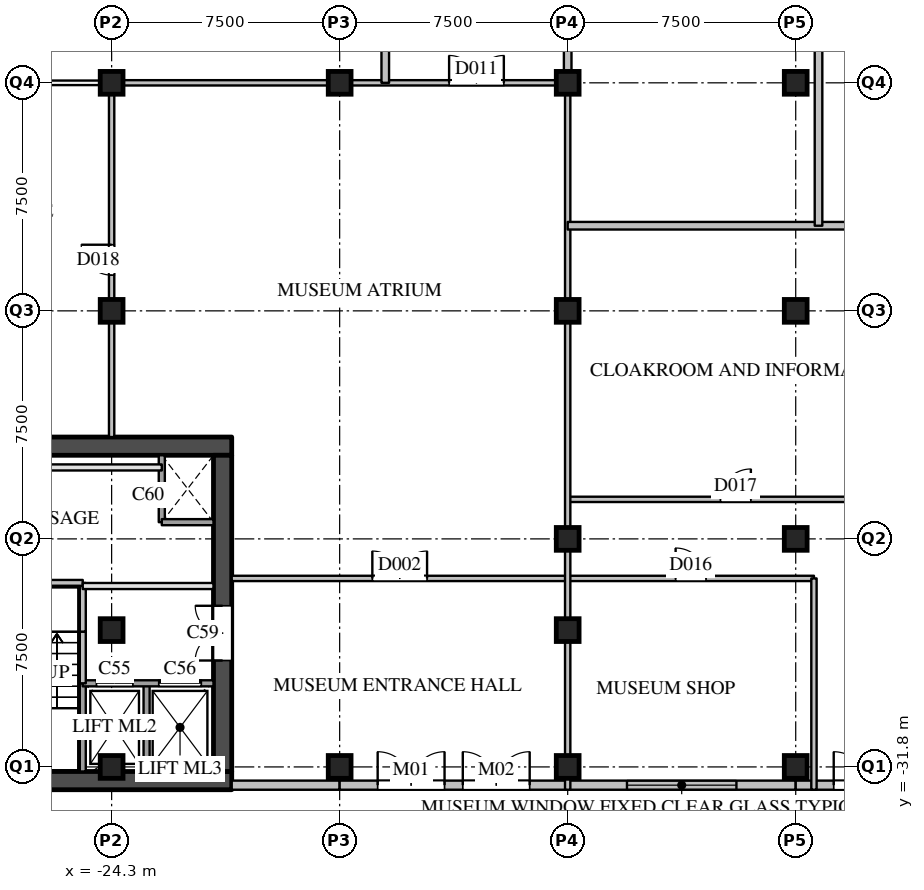
"""IFC4 building model, lengths in metres.
Left out: names, types, materials, properties, quantities, classifications, styles, units other than length and angle.
Written with IfcOpenShell. Run it as: python <this file> out.ifc"""

import sys

from ifc_helpers import new_model, si_unit, direction, frame, frame_2d, origin, origin_2d, place, context, subcontext, project, spatial, rectangle, extrude, element, fill, save


model = new_model("IFC4")
c1 = context("Model", 3, precision=1e-05, world=origin(), true_north=direction((0.0, 1.0)))
c2 = subcontext(c1, "Body", "Model", "MODEL_VIEW")
j1 = project(units=[si_unit("LENGTHUNIT", "METRE"), si_unit("PLANEANGLEUNIT", "RADIAN")], contexts=[c1])
p1 = place(None, origin())
s1 = spatial("IfcSite", under=j1, at=p1, CompositionType="ELEMENT")
p2 = place(p1, origin())
s2 = spatial("IfcBuilding", under=s1, at=p2, CompositionType="ELEMENT")
p3 = place(p2, origin())
s3 = spatial("IfcBuildingStorey", under=s2, at=p3, CompositionType="ELEMENT", Elevation=0.0)
for number, where, z_axis, x_axis in (
    (1, (-24.3, -31.8, 0.0), (0.0, 0.0, 1.0), (1.0, 0.0, 0.0)),
    (2, (-24.3, -16.8, 0.0), (0.0, 0.0, 1.0), (1.0, 0.0, 0.0)),
    (3, (-24.3, -9.3, 0.0), (0.0, 0.0, 1.0), (1.0, 0.0, 0.0)),
    (4, (-16.8, -31.8, 0.0), (0.0, 0.0, 1.0), (1.0, 0.0, 0.0)),
    (5, (-16.8, -9.3, 0.0), (0.0, 0.0, 1.0), (1.0, 0.0, 0.0)),
    (6, (-9.3, -31.8, 0.0), (0.0, 0.0, 1.0), (1.0, 0.0, 0.0)),
    (7, (-9.3, -24.3, 0.0), (0.0, 0.0, 1.0), (1.0, 0.0, 0.0)),
    (8, (-9.3, -16.8, 0.0), (0.0, 0.0, 1.0), (1.0, 0.0, 0.0)),
    (9, (-9.3, -9.3, 0.0), (0.0, 0.0, 1.0), (1.0, 0.0, 0.0)),
    (10, (-1.8, -31.8, 0.0), (0.0, 0.0, 1.0), (1.0, 0.0, 0.0)),
    (11, (-1.8, -24.3, 0.0), (0.0, 0.0, 1.0), (1.0, 0.0, 0.0)),
    (12, (-1.8, -16.8, 0.0), (0.0, 0.0, 1.0), (1.0, 0.0, 0.0)),
    (13, (-1.8, -9.3, 0.0), (0.0, 0.0, 1.0), (1.0, 0.0, 0.0)),
    (14, (-24.3, -27.3, 0.0), (0.0, 0.0, 1.0), (1.0, 0.0, 0.0)),
    (15, (-9.3, -27.3, 0.0), (0.0, 0.0, 1.0), (1.0, 0.0, 0.0)),
):
    element("IfcColumn", number, at=place(p3, frame(where, z_axis=z_axis, x_axis=x_axis)), inside=s3, PredefinedType="COLUMN", context=c2, shape_type="SweptSolid", body=[
        extrude(rectangle(XDim=0.75, YDim=0.75, at=origin_2d()), origin(), (0.0, 0.0, 1.0), 8.0),
    ])
p4 = place(p3, frame((-20.35, -32.4, 0.0), z_axis=(0.0, 0.0, 1.0), x_axis=(1.0, 0.0, 0.0)))
e16 = element("IfcWall", 16, at=p4, inside=s3, PredefinedType="SOLIDWALL", context=c2, shape_type="SweptSolid", body=[
    extrude(rectangle(XDim=3.55, YDim=0.3, at=frame_2d((1.775, 0.0))), origin(), (0.0, 0.0, 1.0), 7.59),
])
p5 = place(p3, frame((-16.8, -32.4, 0.0), z_axis=(0.0, 0.0, 1.0), x_axis=(1.0, 0.0, 0.0)))
e17 = element("IfcWall", 17, at=p5, inside=s3, PredefinedType="SOLIDWALL", context=c2, shape_type="SweptSolid", body=[
    extrude(rectangle(XDim=7.5, YDim=0.3, at=frame_2d((3.75, 0.0))), origin(), (0.0, 0.0, 1.0), 7.59),
])
p6 = place(p5, frame((1.25, 0.0, 0.0)))
e18 = element("IfcOpeningElement", 18, at=p6, cuts=e17, PredefinedType="OPENING", context=c2, shape_type="SweptSolid", body=[
    extrude(rectangle(XDim=2.2, YDim=2.4, at=frame_2d((1.1, 1.2))), frame((0.0, 0.16, 0.0), z_axis=(0.0, -1.0, 0.0), x_axis=(1.0, 0.0, 0.0)), (0.0, 0.0, 1.0), 0.32),
])
p7 = place(p5, frame((4.05, 0.0, 0.0)))
e19 = element("IfcOpeningElement", 19, at=p7, cuts=e17, PredefinedType="OPENING", context=c2, shape_type="SweptSolid", body=[
    extrude(rectangle(XDim=2.2, YDim=2.4, at=frame_2d((1.1, 1.2))), frame((0.0, 0.16, 0.0), z_axis=(0.0, -1.0, 0.0), x_axis=(1.0, 0.0, 0.0)), (0.0, 0.0, 1.0), 0.32),
])
p8 = place(p3, frame((-9.3, -32.4, 0.0), z_axis=(0.0, 0.0, 1.0), x_axis=(1.0, 0.0, 0.0)))
e20 = element("IfcWall", 20, at=p8, inside=s3, PredefinedType="SOLIDWALL", context=c2, shape_type="SweptSolid", body=[
    extrude(rectangle(XDim=7.5, YDim=0.3, at=frame_2d((3.75, 0.0))), origin(), (0.0, 0.0, 1.0), 7.59),
])
p9 = place(p8, frame((1.95, 0.0, 0.9)))
e21 = element("IfcOpeningElement", 21, at=p9, cuts=e20, PredefinedType="OPENING", context=c2, shape_type="SweptSolid", body=[
    extrude(rectangle(XDim=3.6, YDim=3.0, at=frame_2d((1.8, 1.5))), frame((0.0, 0.16, 0.0), z_axis=(0.0, -1.0, 0.0), x_axis=(1.0, 0.0, 0.0)), (0.0, 0.0, 1.0), 0.32),
])
p10 = place(p3, frame((-1.8, -32.4, 0.0), z_axis=(0.0, 0.0, 1.0), x_axis=(1.0, 0.0, 0.0)))
e22 = element("IfcWall", 22, at=p10, inside=s3, PredefinedType="SOLIDWALL", context=c2, shape_type="SweptSolid", body=[
    extrude(rectangle(XDim=3.55, YDim=0.3, at=frame_2d((1.775, 0.0))), origin(), (0.0, 0.0, 1.0), 7.59),
])
p11 = place(p10, frame((1.25, 0.0, 0.0)))
e23 = element("IfcOpeningElement", 23, at=p11, cuts=e22, PredefinedType="OPENING", context=c2, shape_type="SweptSolid", body=[
    extrude(rectangle(XDim=2.2, YDim=2.4, at=frame_2d((1.1, 1.2))), frame((0.0, 0.16, 0.0), z_axis=(0.0, -1.0, 0.0), x_axis=(1.0, 0.0, 0.0)), (0.0, 0.0, 1.0), 0.32),
])
for number, where, z_axis, x_axis in (
    (24, (-32.55, -32.25, 0.0), (0.0, 0.0, 1.0), (1.0, 0.0, 0.0)),
    (25, (-32.55, -21.25, 0.0), (0.0, 0.0, 1.0), (1.0, 0.0, 0.0)),
):
    element("IfcWall", number, at=place(p3, frame(where, z_axis=z_axis, x_axis=x_axis)), inside=s3, PredefinedType="SHEAR", context=c2, shape_type="SweptSolid", body=[
        extrude(rectangle(XDim=12.2, YDim=0.6, at=frame_2d((6.1, 0.0))), origin(), (0.0, 0.0, 1.0), 7.59),
    ])
p12 = place(p3, frame((-20.65, -31.95, 0.0), z_axis=(0.0, 0.0, 1.0), x_axis=(0.0, 1.0, 0.0)))
e26 = element("IfcWall", 26, at=p12, inside=s3, PredefinedType="SHEAR", context=c2, shape_type="SweptSolid", body=[
    extrude(rectangle(XDim=10.4, YDim=0.6, at=frame_2d((5.2, 0.0))), origin(), (0.0, 0.0, 1.0), 7.59),
])
p13 = place(p12, frame((3.65, 0.0, 0.0)))
e27 = element("IfcOpeningElement", 27, at=p13, cuts=e26, PredefinedType="OPENING", context=c2, shape_type="SweptSolid", body=[
    extrude(rectangle(XDim=1.8, YDim=2.1, at=frame_2d((0.9, 1.05))), frame((0.0, 0.31, 0.0), z_axis=(0.0, -1.0, 0.0), x_axis=(1.0, 0.0, 0.0)), (0.0, 0.0, 1.0), 0.62),
])
p14 = place(p3, frame((-25.25, -31.95, 0.0), z_axis=(0.0, 0.0, 1.0), x_axis=(0.0, 1.0, 0.0)))
e28 = element("IfcWall", 28, at=p14, inside=s3, PredefinedType="SOLIDWALL", context=c2, shape_type="SweptSolid", body=[
    extrude(rectangle(XDim=2.9, YDim=0.2, at=frame_2d((1.45, 0.0))), origin(), (0.0, 0.0, 1.0), 7.59),
])
p15 = place(p3, frame((-25.25, -29.05, 0.0), z_axis=(0.0, 0.0, 1.0), x_axis=(0.0, 1.0, 0.0)))
e29 = element("IfcWall", 29, at=p15, inside=s3, PredefinedType="SOLIDWALL", context=c2, shape_type="SweptSolid", body=[
    extrude(rectangle(XDim=1.7, YDim=0.2, at=frame_2d((0.85, 0.0))), origin(), (0.0, 0.0, 1.0), 7.59),
])
p16 = place(p3, frame((-25.25, -27.35, 0.0), z_axis=(0.0, 0.0, 1.0), x_axis=(0.0, 1.0, 0.0)))
e30 = element("IfcWall", 30, at=p16, inside=s3, PredefinedType="SOLIDWALL", context=c2, shape_type="SweptSolid", body=[
    extrude(rectangle(XDim=1.6, YDim=0.2, at=frame_2d((0.8, 0.0))), origin(), (0.0, 0.0, 1.0), 7.59),
])
p17 = place(p3, frame((-23.15, -31.95, 0.0), z_axis=(0.0, 0.0, 1.0), x_axis=(0.0, 1.0, 0.0)))
e31 = element("IfcWall", 31, at=p17, inside=s3, PredefinedType="SOLIDWALL", context=c2, shape_type="SweptSolid", body=[
    extrude(rectangle(XDim=2.9, YDim=0.2, at=frame_2d((1.45, 0.0))), origin(), (0.0, 0.0, 1.0), 7.59),
])
p18 = place(p3, frame((-22.65, -23.75, 0.0), z_axis=(0.0, 0.0, 1.0), x_axis=(0.0, 1.0, 0.0)))
e32 = element("IfcWall", 32, at=p18, inside=s3, PredefinedType="SOLIDWALL", context=c2, shape_type="SweptSolid", body=[
    extrude(rectangle(XDim=2.2, YDim=0.2, at=frame_2d((1.1, 0.0))), origin(), (0.0, 0.0, 1.0), 7.59),
])
p19 = place(p18, frame((0.55, 0.0, 0.0)))
e33 = element("IfcOpeningElement", 33, at=p19, cuts=e32, PredefinedType="OPENING", context=c2, shape_type="SweptSolid", body=[
    extrude(rectangle(XDim=0.7, YDim=2.1, at=frame_2d((0.35, 1.05))), frame((0.0, 0.11, 0.0), z_axis=(0.0, -1.0, 0.0), x_axis=(1.0, 0.0, 0.0)), (0.0, 0.0, 1.0), 0.22),
])
p20 = place(p3, frame((-25.25, -29.05, 0.0), z_axis=(0.0, 0.0, 1.0), x_axis=(1.0, 0.0, 0.0)))
e34 = element("IfcWall", 34, at=p20, inside=s3, PredefinedType="SOLIDWALL", context=c2, shape_type="SweptSolid", body=[
    extrude(rectangle(XDim=4.3, YDim=0.2, at=frame_2d((2.15, 0.0))), origin(), (0.0, 0.0, 1.0), 7.59),
])
p21 = place(p20, frame((0.45, 0.0, 0.0)))
e35 = element("IfcOpeningElement", 35, at=p21, cuts=e34, PredefinedType="OPENING", context=c2, shape_type="SweptSolid", body=[
    extrude(rectangle(XDim=1.2, YDim=2.1, at=frame_2d((0.6, 1.05))), frame((0.0, 0.11, 0.0), z_axis=(0.0, -1.0, 0.0), x_axis=(1.0, 0.0, 0.0)), (0.0, 0.0, 1.0), 0.22),
])
p22 = place(p20, frame((2.5, 0.0, 0.0)))
e36 = element("IfcOpeningElement", 36, at=p22, cuts=e34, PredefinedType="OPENING", context=c2, shape_type="SweptSolid", body=[
    extrude(rectangle(XDim=1.4, YDim=2.1, at=frame_2d((0.7, 1.05))), frame((0.0, 0.11, 0.0), z_axis=(0.0, -1.0, 0.0), x_axis=(1.0, 0.0, 0.0)), (0.0, 0.0, 1.0), 0.22),
])
p23 = place(p3, frame((-25.25, -25.85, 0.0), z_axis=(0.0, 0.0, 1.0), x_axis=(1.0, 0.0, 0.0)))
e37 = element("IfcWall", 37, at=p23, inside=s3, PredefinedType="PARTITIONING", context=c2, shape_type="SweptSolid", body=[
    extrude(rectangle(XDim=4.3, YDim=0.2, at=frame_2d((2.15, 0.0))), origin(), (0.0, 0.0, 1.0), 7.59),
])
p24 = place(p3, frame((-28.5, -25.75, 0.0), z_axis=(0.0, 0.0, 1.0), x_axis=(1.0, 0.0, 0.0)))
e38 = element("IfcWall", 38, at=p24, inside=s3, PredefinedType="SOLIDWALL", context=c2, shape_type="SweptSolid", body=[
    extrude(rectangle(XDim=3.25, YDim=0.2, at=frame_2d((1.625, 0.0))), origin(), (0.0, 0.0, 1.0), 7.59),
])
p25 = place(p24, frame((1.025, 0.0, 0.0)))
e39 = element("IfcOpeningElement", 39, at=p25, cuts=e38, PredefinedType="OPENING", context=c2, shape_type="SweptSolid", body=[
    extrude(rectangle(XDim=1.1, YDim=2.1, at=frame_2d((0.55, 1.05))), frame((0.0, 0.11, 0.0), z_axis=(0.0, -1.0, 0.0), x_axis=(1.0, 0.0, 0.0)), (0.0, 0.0, 1.0), 0.22),
])
p26 = place(p3, frame((-22.65, -23.75, 0.0), z_axis=(0.0, 0.0, 1.0), x_axis=(1.0, 0.0, 0.0)))
e40 = element("IfcWall", 40, at=p26, inside=s3, PredefinedType="SOLIDWALL", context=c2, shape_type="SweptSolid", body=[
    extrude(rectangle(XDim=1.7, YDim=0.2, at=frame_2d((0.85, 0.0))), origin(), (0.0, 0.0, 1.0), 7.59),
])
p27 = place(p3, frame((-31.95, -21.95, 0.0), z_axis=(0.0, 0.0, 1.0), x_axis=(1.0, 0.0, 0.0)))
e41 = element("IfcWall", 41, at=p27, inside=s3, PredefinedType="PARTITIONING", context=c2, shape_type="SweptSolid", body=[
    extrude(rectangle(XDim=9.3, YDim=0.2, at=frame_2d((4.65, 0.0))), origin(), (0.0, 0.0, 1.0), 7.59),
])
p28 = place(p3, frame((-20.35, -25.6, 0.0), z_axis=(0.0, 0.0, 1.0), x_axis=(1.0, 0.0, 0.0)))
e42 = element("IfcWall", 42, at=p28, inside=s3, PredefinedType="PARTITIONING", context=c2, shape_type="SweptSolid", body=[
    extrude(rectangle(XDim=19.15, YDim=0.175, at=frame_2d((9.575, 0.0))), origin(), (0.0, 0.0, 1.0), 6.79),
])
p29 = place(p28, frame((4.625, 0.0, 0.0)))
e43 = element("IfcOpeningElement", 43, at=p29, cuts=e42, PredefinedType="OPENING", context=c2, shape_type="SweptSolid", body=[
    extrude(rectangle(XDim=1.8, YDim=2.1, at=frame_2d((0.9, 1.05))), frame((0.0, 0.097, 0.0), z_axis=(0.0, -1.0, 0.0), x_axis=(1.0, 0.0, 0.0)), (0.0, 0.0, 1.0), 0.195),
])
p30 = place(p28, frame((14.6, 0.0, 0.0)))
e44 = element("IfcOpeningElement", 44, at=p30, cuts=e42, PredefinedType="OPENING", context=c2, shape_type="SweptSolid", body=[
    extrude(rectangle(XDim=1.0, YDim=2.1, at=frame_2d((0.5, 1.05))), frame((0.0, 0.097, 0.0), z_axis=(0.0, -1.0, 0.0), x_axis=(1.0, 0.0, 0.0)), (0.0, 0.0, 1.0), 0.195),
])
p31 = place(p3, frame((-9.3, -23.0, 0.0), z_axis=(0.0, 0.0, 1.0), x_axis=(1.0, 0.0, 0.0)))
e45 = element("IfcWall", 45, at=p31, inside=s3, PredefinedType="PARTITIONING", context=c2, shape_type="SweptSolid", body=[
    extrude(rectangle(XDim=11.05, YDim=0.175, at=frame_2d((5.525, 0.0))), origin(), (0.0, 0.0, 1.0), 6.79),
])
p32 = place(p31, frame((5.025, 0.0, 0.0)))
e46 = element("IfcOpeningElement", 46, at=p32, cuts=e45, PredefinedType="OPENING", context=c2, shape_type="SweptSolid", body=[
    extrude(rectangle(XDim=1.0, YDim=2.1, at=frame_2d((0.5, 1.05))), frame((0.0, 0.097, 0.0), z_axis=(0.0, -1.0, 0.0), x_axis=(1.0, 0.0, 0.0)), (0.0, 0.0, 1.0), 0.195),
])
p33 = place(p3, frame((-24.3, -9.3, 0.0), z_axis=(0.0, 0.0, 1.0), x_axis=(1.0, 0.0, 0.0)))
e47 = element("IfcWall", 47, at=p33, inside=s3, PredefinedType="PARTITIONING", context=c2, shape_type="SweptSolid", body=[
    extrude(rectangle(XDim=15.0, YDim=0.175, at=frame_2d((7.5, 0.0))), origin(), (0.0, 0.0, 1.0), 6.79),
])
p34 = place(p33, frame((11.1, 0.0, 0.0)))
e48 = element("IfcOpeningElement", 48, at=p34, cuts=e47, PredefinedType="OPENING", context=c2, shape_type="SweptSolid", body=[
    extrude(rectangle(XDim=1.8, YDim=2.1, at=frame_2d((0.9, 1.05))), frame((0.0, 0.097, 0.0), z_axis=(0.0, -1.0, 0.0), x_axis=(1.0, 0.0, 0.0)), (0.0, 0.0, 1.0), 0.195),
])
p35 = place(p3, frame((-24.3, -20.95, 0.0), z_axis=(0.0, 0.0, 1.0), x_axis=(0.0, 1.0, 0.0)))
e49 = element("IfcWall", 49, at=p35, inside=s3, PredefinedType="PARTITIONING", context=c2, shape_type="SweptSolid", body=[
    extrude(rectangle(XDim=11.65, YDim=0.175, at=frame_2d((5.825, 0.0))), origin(), (0.0, 0.0, 1.0), 6.79),
])
p36 = place(p35, frame((5.325, 0.0, 0.0)))
e50 = element("IfcOpeningElement", 50, at=p36, cuts=e49, PredefinedType="OPENING", context=c2, shape_type="SweptSolid", body=[
    extrude(rectangle(XDim=1.0, YDim=2.1, at=frame_2d((0.5, 1.05))), frame((0.0, 0.097, 0.0), z_axis=(0.0, -1.0, 0.0), x_axis=(1.0, 0.0, 0.0)), (0.0, 0.0, 1.0), 0.195),
])
p37 = place(p3, frame((-9.3, -32.55, 0.0), z_axis=(0.0, 0.0, 1.0), x_axis=(0.0, 1.0, 0.0)))
e51 = element("IfcWall", 51, at=p37, inside=s3, PredefinedType="PARTITIONING", context=c2, shape_type="SweptSolid", body=[
    extrude(rectangle(XDim=23.25, YDim=0.175, at=frame_2d((11.625, 0.0))), origin(), (0.0, 0.0, 1.0), 6.79),
])
p38 = place(p3, frame((-1.2, -32.55, 0.0), z_axis=(0.0, 0.0, 1.0), x_axis=(0.0, 1.0, 0.0)))
e52 = element("IfcWall", 52, at=p38, inside=s3, PredefinedType="PARTITIONING", context=c2, shape_type="SweptSolid", body=[
    extrude(rectangle(XDim=6.95, YDim=0.175, at=frame_2d((3.475, 0.0))), origin(), (0.0, 0.0, 1.0), 7.59),
])
p39 = place(p3, frame((-27.3, -9.3, 0.0), z_axis=(0.0, 0.0, 1.0), x_axis=(1.0, 0.0, 0.0)))
e53 = element("IfcWall", 53, at=p39, inside=s3, PredefinedType="PARTITIONING", context=c2, shape_type="SweptSolid", body=[
    extrude(rectangle(XDim=3.0, YDim=0.15, at=frame_2d((1.5, 0.0))), origin(), (0.0, 0.0, 1.0), 6.79),
])
p40 = place(p3, frame((-9.3, -14.0, 0.0), z_axis=(0.0, 0.0, 1.0), x_axis=(1.0, 0.0, 0.0)))
e54 = element("IfcWall", 54, at=p40, inside=s3, PredefinedType="PARTITIONING", context=c2, shape_type="SweptSolid", body=[
    extrude(rectangle(XDim=13.425, YDim=0.25, at=frame_2d((6.712, 0.0))), origin(), (0.0, 0.0, 1.0), 6.79),
])
p41 = place(p3, frame((-15.3, -9.3, 0.0), z_axis=(0.0, 0.0, 1.0), x_axis=(0.0, 1.0, 0.0)))
e55 = element("IfcWall", 55, at=p41, inside=s3, PredefinedType="PARTITIONING", context=c2, shape_type="SweptSolid", body=[
    extrude(rectangle(XDim=21.3, YDim=0.25, at=frame_2d((10.65, 0.0))), origin(), (0.0, 0.0, 1.0), 6.79),
])
p42 = place(p3, frame((-9.3, -9.3, 0.0), z_axis=(0.0, 0.0, 1.0), x_axis=(0.0, 1.0, 0.0)))
e56 = element("IfcWall", 56, at=p42, inside=s3, PredefinedType="PARTITIONING", context=c2, shape_type="SweptSolid", body=[
    extrude(rectangle(XDim=8.375, YDim=0.25, at=frame_2d((4.188, 0.0))), origin(), (0.0, 0.0, 1.0), 6.79),
])
p43 = place(p3, frame((-1.05, -14.0, 0.0), z_axis=(0.0, 0.0, 1.0), x_axis=(0.0, 1.0, 0.0)))
e57 = element("IfcWall", 57, at=p43, inside=s3, PredefinedType="PARTITIONING", context=c2, shape_type="SweptSolid", body=[
    extrude(rectangle(XDim=9.95, YDim=0.25, at=frame_2d((4.975, 0.0))), origin(), (0.0, 0.0, 1.0), 6.79),
])
p44 = place(p6, origin())
e58 = element("IfcDoor", 58, at=p44, inside=s3, OperationType="DOUBLE_DOOR_SINGLE_SWING", PredefinedType="DOOR", context=c2, shape_type="SweptSolid", body=[
    extrude(rectangle(XDim=2.2, YDim=2.4, at=frame_2d((1.1, 1.2))), frame((0.0, 0.025, 0.0), z_axis=(0.0, -1.0, 0.0), x_axis=(1.0, 0.0, 0.0)), (0.0, 0.0, 1.0), 0.05),
])
fill(e18, e58)
p45 = place(p7, origin())
e59 = element("IfcDoor", 59, at=p45, inside=s3, OperationType="DOUBLE_DOOR_SINGLE_SWING", PredefinedType="DOOR", context=c2, shape_type="SweptSolid", body=[
    extrude(rectangle(XDim=2.2, YDim=2.4, at=frame_2d((1.1, 1.2))), frame((0.0, 0.025, 0.0), z_axis=(0.0, -1.0, 0.0), x_axis=(1.0, 0.0, 0.0)), (0.0, 0.0, 1.0), 0.05),
])
fill(e19, e59)
p46 = place(p9, origin())
e60 = element("IfcWindow", 60, at=p46, inside=s3, PartitioningType="SINGLE_PANEL", PredefinedType="WINDOW", context=c2, shape_type="SweptSolid", body=[
    extrude(rectangle(XDim=3.6, YDim=3.0, at=frame_2d((1.8, 1.5))), frame((0.0, 0.03, 0.0), z_axis=(0.0, -1.0, 0.0), x_axis=(1.0, 0.0, 0.0)), (0.0, 0.0, 1.0), 0.06),
])
fill(e21, e60)
p47 = place(p11, origin())
e61 = element("IfcDoor", 61, at=p47, inside=s3, OperationType="DOUBLE_DOOR_SINGLE_SWING", PredefinedType="DOOR", context=c2, shape_type="SweptSolid", body=[
    extrude(rectangle(XDim=2.2, YDim=2.4, at=frame_2d((1.1, 1.2))), frame((0.0, 0.025, 0.0), z_axis=(0.0, -1.0, 0.0), x_axis=(1.0, 0.0, 0.0)), (0.0, 0.0, 1.0), 0.05),
])
fill(e23, e61)
p48 = place(p21, origin())
e62 = element("IfcDoor", 62, at=p48, inside=s3, OperationType="SLIDING_TO_LEFT", PredefinedType="DOOR", context=c2, shape_type="SweptSolid", body=[
    extrude(rectangle(XDim=1.2, YDim=2.1, at=frame_2d((0.6, 1.05))), frame((0.0, 0.025, 0.0), z_axis=(0.0, -1.0, 0.0), x_axis=(1.0, 0.0, 0.0)), (0.0, 0.0, 1.0), 0.05),
])
fill(e35, e62)
p49 = place(p22, origin())
e63 = element("IfcDoor", 63, at=p49, inside=s3, OperationType="SLIDING_TO_LEFT", PredefinedType="DOOR", context=c2, shape_type="SweptSolid", body=[
    extrude(rectangle(XDim=1.4, YDim=2.1, at=frame_2d((0.7, 1.05))), frame((0.0, 0.025, 0.0), z_axis=(0.0, -1.0, 0.0), x_axis=(1.0, 0.0, 0.0)), (0.0, 0.0, 1.0), 0.05),
])
fill(e36, e63)
p50 = place(p13, origin())
e64 = element("IfcDoor", 64, at=p50, inside=s3, OperationType="DOUBLE_DOOR_SINGLE_SWING", PredefinedType="DOOR", context=c2, shape_type="SweptSolid", body=[
    extrude(rectangle(XDim=1.8, YDim=2.1, at=frame_2d((0.9, 1.05))), frame((0.0, 0.025, 0.0), z_axis=(0.0, -1.0, 0.0), x_axis=(1.0, 0.0, 0.0)), (0.0, 0.0, 1.0), 0.05),
])
fill(e27, e64)
p51 = place(p19, origin())
e65 = element("IfcDoor", 65, at=p51, inside=s3, OperationType="SINGLE_SWING_LEFT", PredefinedType="DOOR", context=c2, shape_type="SweptSolid", body=[
    extrude(rectangle(XDim=0.7, YDim=2.1, at=frame_2d((0.35, 1.05))), frame((0.0, 0.025, 0.0), z_axis=(0.0, -1.0, 0.0), x_axis=(1.0, 0.0, 0.0)), (0.0, 0.0, 1.0), 0.05),
])
fill(e33, e65)
p52 = place(p29, origin())
e66 = element("IfcDoor", 66, at=p52, inside=s3, OperationType="DOUBLE_DOOR_SINGLE_SWING", PredefinedType="DOOR", context=c2, shape_type="SweptSolid", body=[
    extrude(rectangle(XDim=1.8, YDim=2.1, at=frame_2d((0.9, 1.05))), frame((0.0, 0.025, 0.0), z_axis=(0.0, -1.0, 0.0), x_axis=(1.0, 0.0, 0.0)), (0.0, 0.0, 1.0), 0.05),
])
fill(e43, e66)
p53 = place(p34, origin())
e67 = element("IfcDoor", 67, at=p53, inside=s3, OperationType="DOUBLE_DOOR_SINGLE_SWING", PredefinedType="DOOR", context=c2, shape_type="SweptSolid", body=[
    extrude(rectangle(XDim=1.8, YDim=2.1, at=frame_2d((0.9, 1.05))), frame((0.0, 0.025, 0.0), z_axis=(0.0, -1.0, 0.0), x_axis=(1.0, 0.0, 0.0)), (0.0, 0.0, 1.0), 0.05),
])
fill(e48, e67)
p54 = place(p30, origin())
e68 = element("IfcDoor", 68, at=p54, inside=s3, OperationType="SINGLE_SWING_LEFT", PredefinedType="DOOR", context=c2, shape_type="SweptSolid", body=[
    extrude(rectangle(XDim=1.0, YDim=2.1, at=frame_2d((0.5, 1.05))), frame((0.0, 0.025, 0.0), z_axis=(0.0, -1.0, 0.0), x_axis=(1.0, 0.0, 0.0)), (0.0, 0.0, 1.0), 0.05),
])
fill(e44, e68)
p55 = place(p32, origin())
e69 = element("IfcDoor", 69, at=p55, inside=s3, OperationType="SINGLE_SWING_RIGHT", PredefinedType="DOOR", context=c2, shape_type="SweptSolid", body=[
    extrude(rectangle(XDim=1.0, YDim=2.1, at=frame_2d((0.5, 1.05))), frame((0.0, 0.025, 0.0), z_axis=(0.0, -1.0, 0.0), x_axis=(1.0, 0.0, 0.0)), (0.0, 0.0, 1.0), 0.05),
])
fill(e46, e69)
p56 = place(p36, origin())
e70 = element("IfcDoor", 70, at=p56, inside=s3, OperationType="SINGLE_SWING_RIGHT", PredefinedType="DOOR", context=c2, shape_type="SweptSolid", body=[
    extrude(rectangle(XDim=1.0, YDim=2.1, at=frame_2d((0.5, 1.05))), frame((0.0, 0.025, 0.0), z_axis=(0.0, -1.0, 0.0), x_axis=(1.0, 0.0, 0.0)), (0.0, 0.0, 1.0), 0.05),
])
fill(e50, e70)
save(model, sys.argv[1])
